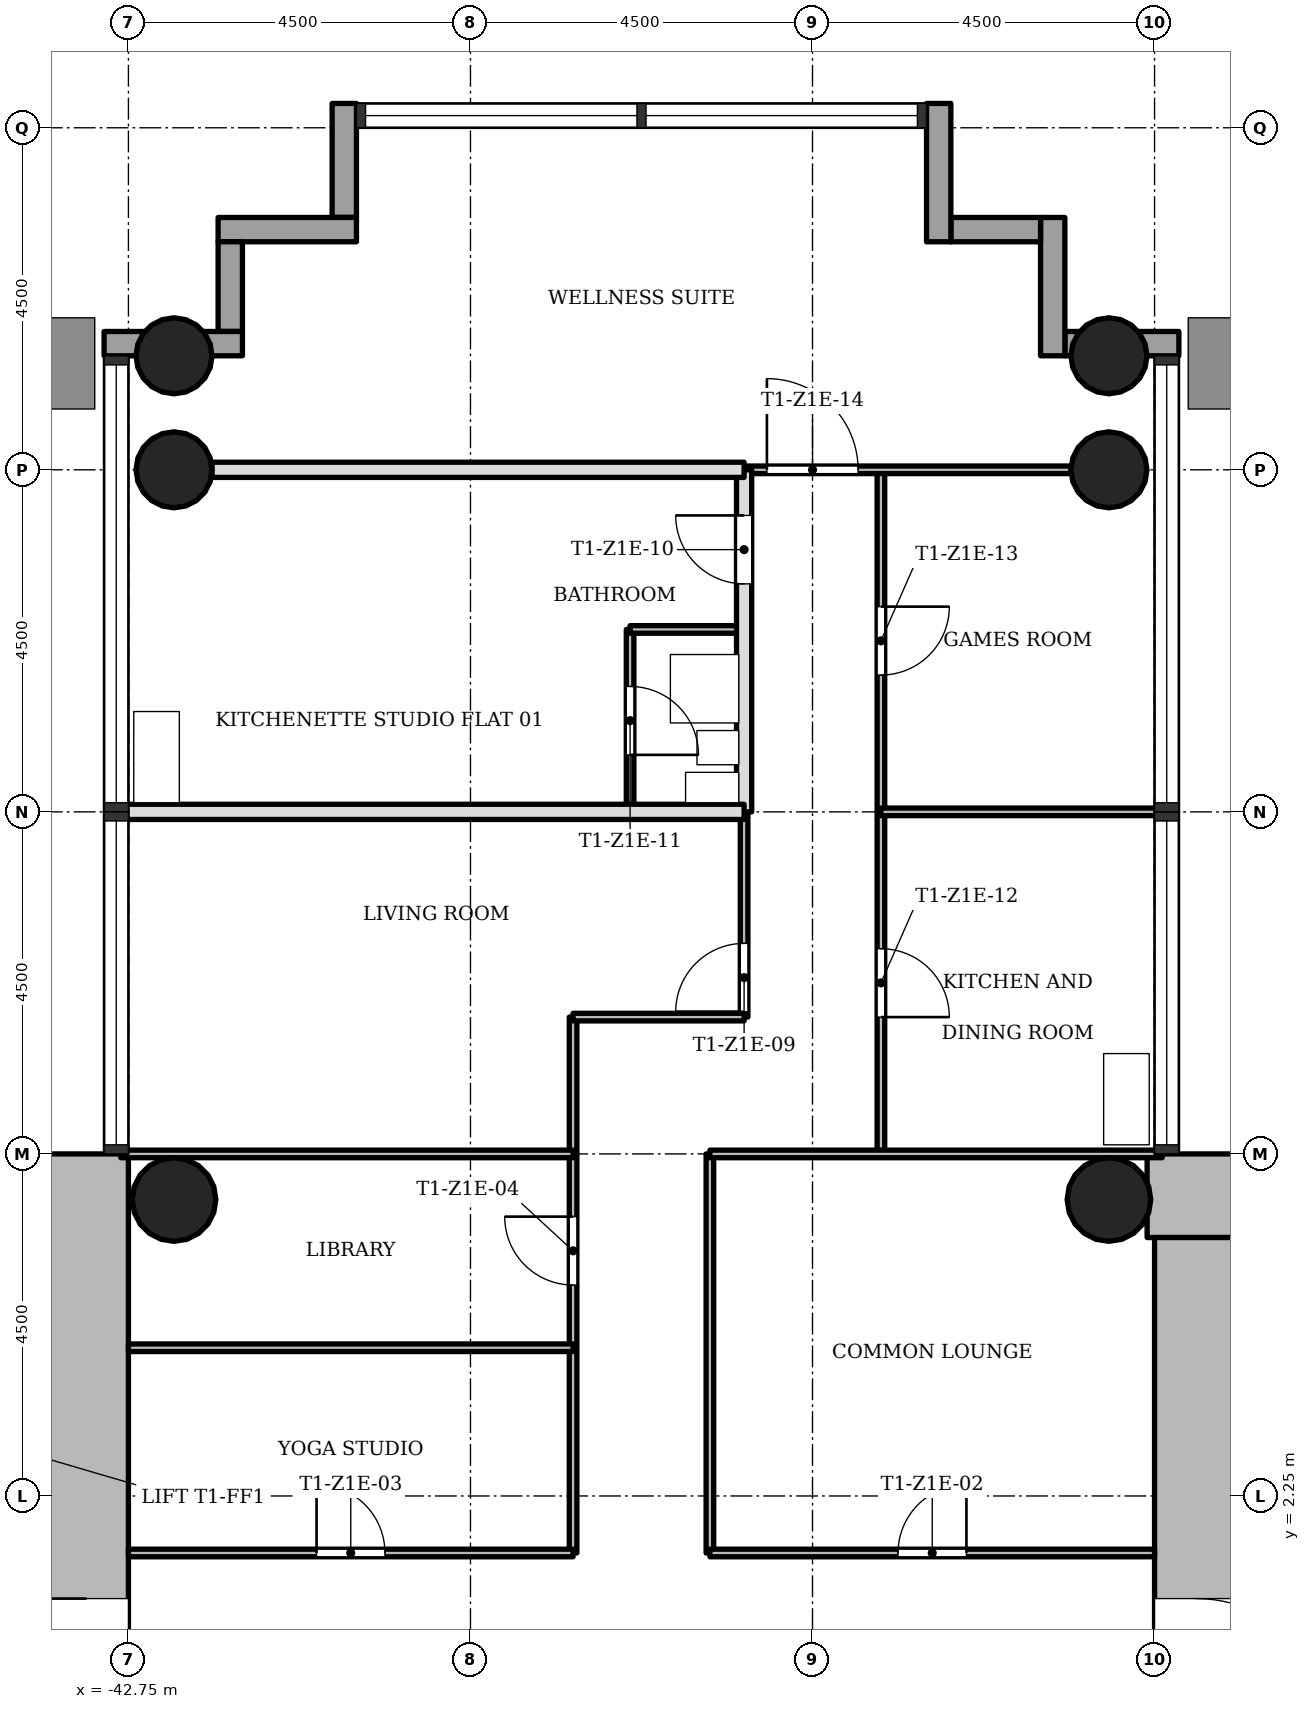
"""IFC4 building model, lengths in metres.
Left out: names, types, materials, properties, quantities, classifications, styles, units other than length and angle.
Written with IfcOpenShell. Run it as: python <this file> out.ifc"""

import sys

from ifc_helpers import new_model, si_unit, direction, frame, frame_2d, origin, origin_2d, place, context, subcontext, project, spatial, rectangle, hollow_circle, extrude, element, fill, save


model = new_model("IFC4")
c1 = context("Model", 3, precision=1e-05, world=origin(), true_north=direction((0.0, 1.0)))
c2 = subcontext(c1, "Body", "Model", "MODEL_VIEW")
j1 = project(units=[si_unit("LENGTHUNIT", "METRE"), si_unit("PLANEANGLEUNIT", "RADIAN")], contexts=[c1])
p1 = place(None, origin())
s1 = spatial("IfcSite", under=j1, at=p1, CompositionType="ELEMENT")
p2 = place(p1, origin())
s2 = spatial("IfcBuilding", under=s1, at=p2, CompositionType="ELEMENT")
p3 = place(p2, frame((0.0, 0.0, 65.3)))
s3 = spatial("IfcBuildingStorey", under=s2, at=p3, CompositionType="ELEMENT", Elevation=65.3)
p4 = place(p3, frame((-21.35, 6.2, 0.0), z_axis=(0.0, 0.0, 1.0), x_axis=(-1.0, 0.0, 0.0)))
e1 = element("IfcWall", 1, at=p4, inside=s3, PredefinedType="SHEAR", context=c2, shape_type="SweptSolid", body=[
    extrude(rectangle(XDim=7.998, YDim=1.1, at=frame_2d((3.999, 0.0))), origin(), (0.0, 0.0, 1.0), 3.4),
])
p5 = place(p3, frame((-28.7, 5.65, 0.0), z_axis=(0.0, 0.0, 1.0), x_axis=(0.0, -1.0, 0.0)))
e2 = element("IfcWall", 2, at=p5, inside=s3, PredefinedType="SHEAR", context=c2, shape_type="SweptSolid", body=[
    extrude(rectangle(XDim=12.4, YDim=1.1, at=frame_2d((6.2, 0.0))), origin(), (0.0, 0.0, 1.0), 3.4),
])
p6 = place(p5, frame((4.75, 0.0, 0.0)))
e3 = element("IfcOpeningElement", 3, at=p6, cuts=e2, PredefinedType="OPENING", context=c2, shape_type="SweptSolid", body=[
    extrude(rectangle(XDim=1.8, YDim=2.1, at=frame_2d((0.9, 1.05))), frame((0.0, 0.56, 0.0), z_axis=(0.0, -1.0, 0.0), x_axis=(1.0, 0.0, 0.0)), (0.0, 0.0, 1.0), 1.12),
])
p7 = place(p3, frame((-43.3, -5.65, 0.0), z_axis=(0.0, 0.0, 1.0), x_axis=(0.0, 1.0, 0.0)))
e4 = element("IfcWall", 4, at=p7, inside=s3, PredefinedType="SHEAR", context=c2, shape_type="SweptSolid", body=[
    extrude(rectangle(XDim=12.4, YDim=1.1, at=frame_2d((6.2, 0.0))), origin(), (0.0, 0.0, 1.0), 3.4),
])
p8 = place(p7, frame((4.75, 0.0, 0.0)))
e5 = element("IfcOpeningElement", 5, at=p8, cuts=e4, PredefinedType="OPENING", context=c2, shape_type="SweptSolid", body=[
    extrude(rectangle(XDim=1.8, YDim=2.1, at=frame_2d((0.9, 1.05))), frame((0.0, 0.56, 0.0), z_axis=(0.0, -1.0, 0.0), x_axis=(1.0, 0.0, 0.0)), (0.0, 0.0, 1.0), 1.12),
])
for number, where, z_axis, x_axis in (
    (6, (-29.85, 15.75, 0.0), (0.0, 0.0, 1.0), (1.0, 0.0, 0.0)),
    (7, (-42.15, 15.75, 0.0), (0.0, 0.0, 1.0), (1.0, 0.0, 0.0)),
    (8, (-29.85, 17.25, 0.0), (0.0, 0.0, 1.0), (1.0, 0.0, 0.0)),
    (9, (-42.15, 17.25, 0.0), (0.0, 0.0, 1.0), (1.0, 0.0, 0.0)),
):
    element("IfcColumn", number, at=place(p3, frame(where, z_axis=z_axis, x_axis=x_axis)), inside=s3, PredefinedType="COLUMN", context=c2, shape_type="SweptSolid", body=[
        extrude(hollow_circle(Radius=0.5, WallThickness=0.036, at=origin_2d()), origin(), (0.0, 0.0, 1.0), 3.4),
    ])
for number, where, z_axis, x_axis in (
    (10, (-29.85, 6.15, 0.0), (0.0, 0.0, 1.0), (1.0, 0.0, 0.0)),
    (11, (-42.15, 6.15, 0.0), (0.0, 0.0, 1.0), (1.0, 0.0, 0.0)),
):
    element("IfcColumn", number, at=place(p3, frame(where, z_axis=z_axis, x_axis=x_axis)), inside=s3, PredefinedType="COLUMN", context=c2, shape_type="SweptSolid", body=[
        extrude(hollow_circle(Radius=0.55, WallThickness=0.04, at=origin_2d()), origin(), (0.0, 0.0, 1.0), 3.4),
    ])
p9 = place(p3, frame((-28.93, 17.41, -0.3), z_axis=(0.0, 0.0, 1.0), x_axis=(-1.0, 0.0, 0.0)))
e12 = element("IfcWall", 12, at=p9, inside=s3, PredefinedType="STANDARD", context=c2, shape_type="SweptSolid", body=[
    extrude(rectangle(XDim=1.5, YDim=0.32, at=frame_2d((0.75, 0.0))), origin(), (0.0, 0.0, 1.0), 3.4),
])
p10 = place(p3, frame((-30.59, 17.25, -0.3), z_axis=(0.0, 0.0, 1.0), x_axis=(0.0, 1.0, 0.0)))
e13 = element("IfcWall", 13, at=p10, inside=s3, PredefinedType="STANDARD", context=c2, shape_type="SweptSolid", body=[
    extrude(rectangle(XDim=1.82, YDim=0.32, at=frame_2d((0.91, 0.0))), origin(), (0.0, 0.0, 1.0), 3.4),
])
p11 = place(p3, frame((-30.75, 18.91, -0.3), z_axis=(0.0, 0.0, 1.0), x_axis=(-1.0, 0.0, 0.0)))
e14 = element("IfcWall", 14, at=p11, inside=s3, PredefinedType="STANDARD", context=c2, shape_type="SweptSolid", body=[
    extrude(rectangle(XDim=1.18, YDim=0.32, at=frame_2d((0.59, 0.0))), origin(), (0.0, 0.0, 1.0), 3.4),
])
p12 = place(p3, frame((-32.09, 18.75, -0.3), z_axis=(0.0, 0.0, 1.0), x_axis=(0.0, 1.0, 0.0)))
e15 = element("IfcWall", 15, at=p12, inside=s3, PredefinedType="STANDARD", context=c2, shape_type="SweptSolid", body=[
    extrude(rectangle(XDim=1.82, YDim=0.32, at=frame_2d((0.91, 0.0))), origin(), (0.0, 0.0, 1.0), 3.4),
])
p13 = place(p3, frame((-39.91, 20.57, -0.3), z_axis=(0.0, 0.0, 1.0), x_axis=(0.0, -1.0, 0.0)))
e16 = element("IfcWall", 16, at=p13, inside=s3, PredefinedType="STANDARD", context=c2, shape_type="SweptSolid", body=[
    extrude(rectangle(XDim=1.5, YDim=0.32, at=frame_2d((0.75, 0.0))), origin(), (0.0, 0.0, 1.0), 3.4),
])
p14 = place(p3, frame((-39.75, 18.91, -0.3), z_axis=(0.0, 0.0, 1.0), x_axis=(-1.0, 0.0, 0.0)))
e17 = element("IfcWall", 17, at=p14, inside=s3, PredefinedType="STANDARD", context=c2, shape_type="SweptSolid", body=[
    extrude(rectangle(XDim=1.82, YDim=0.32, at=frame_2d((0.91, 0.0))), origin(), (0.0, 0.0, 1.0), 3.4),
])
p15 = place(p3, frame((-41.41, 18.75, -0.3), z_axis=(0.0, 0.0, 1.0), x_axis=(0.0, -1.0, 0.0)))
e18 = element("IfcWall", 18, at=p15, inside=s3, PredefinedType="STANDARD", context=c2, shape_type="SweptSolid", body=[
    extrude(rectangle(XDim=1.18, YDim=0.32, at=frame_2d((0.59, 0.0))), origin(), (0.0, 0.0, 1.0), 3.4),
])
p16 = place(p3, frame((-41.25, 17.41, -0.3), z_axis=(0.0, 0.0, 1.0), x_axis=(-1.0, 0.0, 0.0)))
e19 = element("IfcWall", 19, at=p16, inside=s3, PredefinedType="STANDARD", context=c2, shape_type="SweptSolid", body=[
    extrude(rectangle(XDim=1.82, YDim=0.32, at=frame_2d((0.91, 0.0))), origin(), (0.0, 0.0, 1.0), 3.4),
])
p17 = place(p3, frame((-36.9, 1.5, 0.0), z_axis=(0.0, 0.0, 1.0), x_axis=(0.0, 1.0, 0.0)))
e20 = element("IfcWall", 20, at=p17, inside=s3, PredefinedType="PARTITIONING", context=c2, shape_type="SweptSolid", body=[
    extrude(rectangle(XDim=7.05, YDim=0.1, at=frame_2d((3.525, 0.0))), origin(), (0.0, 0.0, 1.0), 3.0),
])
p18 = place(p17, frame((3.525, 0.0, 0.0)))
e21 = element("IfcOpeningElement", 21, at=p18, cuts=e20, PredefinedType="OPENING", context=c2, shape_type="SweptSolid", body=[
    extrude(rectangle(XDim=0.9, YDim=2.1, at=frame_2d((0.45, 1.05))), frame((0.0, 0.06, 0.0), z_axis=(0.0, -1.0, 0.0), x_axis=(1.0, 0.0, 0.0)), (0.0, 0.0, 1.0), 0.12),
])
p19 = place(p3, frame((-36.15, 11.25, 0.0), z_axis=(0.0, 0.0, 1.0), x_axis=(0.0, 1.0, 0.0)))
e22 = element("IfcWall", 22, at=p19, inside=s3, PredefinedType="PARTITIONING", context=c2, shape_type="SweptSolid", body=[
    extrude(rectangle(XDim=2.4, YDim=0.1, at=frame_2d((1.2, 0.0))), origin(), (0.0, 0.0, 1.0), 3.0),
])
p20 = place(p19, frame((0.75, 0.0, 0.0)))
e23 = element("IfcOpeningElement", 23, at=p20, cuts=e22, PredefinedType="OPENING", context=c2, shape_type="SweptSolid", body=[
    extrude(rectangle(XDim=0.9, YDim=2.1, at=frame_2d((0.45, 1.05))), frame((0.0, 0.06, 0.0), z_axis=(0.0, -1.0, 0.0), x_axis=(1.0, 0.0, 0.0)), (0.0, 0.0, 1.0), 0.12),
])
p21 = place(p3, frame((-35.1, 1.5, 0.0), z_axis=(0.0, 0.0, 1.0), x_axis=(0.0, 1.0, 0.0)))
e24 = element("IfcWall", 24, at=p21, inside=s3, PredefinedType="PARTITIONING", context=c2, shape_type="SweptSolid", body=[
    extrude(rectangle(XDim=5.25, YDim=0.1, at=frame_2d((2.625, 0.0))), origin(), (0.0, 0.0, 1.0), 3.0),
])
p22 = place(p3, frame((-34.65, 8.55, 0.0), z_axis=(0.0, 0.0, 1.0), x_axis=(0.0, 1.0, 0.0)))
e25 = element("IfcWall", 25, at=p22, inside=s3, PredefinedType="PARTITIONING", context=c2, shape_type="SweptSolid", body=[
    extrude(rectangle(XDim=2.7, YDim=0.1, at=frame_2d((1.35, 0.0))), origin(), (0.0, 0.0, 1.0), 3.0),
])
p23 = place(p22, frame((0.07, 0.0, 0.0)))
e26 = element("IfcOpeningElement", 26, at=p23, cuts=e25, PredefinedType="OPENING", context=c2, shape_type="SweptSolid", body=[
    extrude(rectangle(XDim=0.9, YDim=2.1, at=frame_2d((0.45, 1.05))), frame((0.0, 0.06, 0.0), z_axis=(0.0, -1.0, 0.0), x_axis=(1.0, 0.0, 0.0)), (0.0, 0.0, 1.0), 0.12),
])
p24 = place(p3, frame((-34.65, 11.25, 0.0), z_axis=(0.0, 0.0, 1.0), x_axis=(0.0, 1.0, 0.0)))
e27 = element("IfcWall", 27, at=p24, inside=s3, PredefinedType="SOLIDWALL", context=c2, shape_type="SweptSolid", body=[
    extrude(rectangle(XDim=4.5, YDim=0.2, at=frame_2d((2.25, 0.0))), origin(), (0.0, 0.0, 1.0), 3.0),
])
p25 = place(p24, frame((3.0, 0.0, 0.0)))
e28 = element("IfcOpeningElement", 28, at=p25, cuts=e27, PredefinedType="OPENING", context=c2, shape_type="SweptSolid", body=[
    extrude(rectangle(XDim=0.9, YDim=2.1, at=frame_2d((0.45, 1.05))), frame((0.0, 0.11, 0.0), z_axis=(0.0, -1.0, 0.0), x_axis=(1.0, 0.0, 0.0)), (0.0, 0.0, 1.0), 0.22),
])
p26 = place(p3, frame((-32.85, 6.75, 0.0), z_axis=(0.0, 0.0, 1.0), x_axis=(0.0, 1.0, 0.0)))
e29 = element("IfcWall", 29, at=p26, inside=s3, PredefinedType="PARTITIONING", context=c2, shape_type="SweptSolid", body=[
    extrude(rectangle(XDim=9.0, YDim=0.1, at=frame_2d((4.5, 0.0))), origin(), (0.0, 0.0, 1.0), 3.0),
])
p27 = place(p26, frame((1.8, 0.0, 0.0)))
e30 = element("IfcOpeningElement", 30, at=p27, cuts=e29, PredefinedType="OPENING", context=c2, shape_type="SweptSolid", body=[
    extrude(rectangle(XDim=0.9, YDim=2.1, at=frame_2d((0.45, 1.05))), frame((0.0, 0.06, 0.0), z_axis=(0.0, -1.0, 0.0), x_axis=(1.0, 0.0, 0.0)), (0.0, 0.0, 1.0), 0.12),
])
p28 = place(p26, frame((6.3, 0.0, 0.0)))
e31 = element("IfcOpeningElement", 31, at=p28, cuts=e29, PredefinedType="OPENING", context=c2, shape_type="SweptSolid", body=[
    extrude(rectangle(XDim=0.9, YDim=2.1, at=frame_2d((0.45, 1.05))), frame((0.0, 0.06, 0.0), z_axis=(0.0, -1.0, 0.0), x_axis=(1.0, 0.0, 0.0)), (0.0, 0.0, 1.0), 0.12),
])
p29 = place(p3, frame((-42.75, 1.5, 0.0), z_axis=(0.0, 0.0, 1.0), x_axis=(1.0, 0.0, 0.0)))
e32 = element("IfcWall", 32, at=p29, inside=s3, PredefinedType="PARTITIONING", context=c2, shape_type="SweptSolid", body=[
    extrude(rectangle(XDim=5.85, YDim=0.1, at=frame_2d((2.925, 0.0))), origin(), (0.0, 0.0, 1.0), 3.0),
])
p30 = place(p29, frame((2.475, 0.0, 0.0)))
e33 = element("IfcOpeningElement", 33, at=p30, cuts=e32, PredefinedType="OPENING", context=c2, shape_type="SweptSolid", body=[
    extrude(rectangle(XDim=0.9, YDim=2.1, at=frame_2d((0.45, 1.05))), frame((0.0, 0.06, 0.0), z_axis=(0.0, -1.0, 0.0), x_axis=(1.0, 0.0, 0.0)), (0.0, 0.0, 1.0), 0.12),
])
p31 = place(p3, frame((-35.1, 1.5, 0.0), z_axis=(0.0, 0.0, 1.0), x_axis=(1.0, 0.0, 0.0)))
e34 = element("IfcWall", 34, at=p31, inside=s3, PredefinedType="PARTITIONING", context=c2, shape_type="SweptSolid", body=[
    extrude(rectangle(XDim=5.85, YDim=0.1, at=frame_2d((2.925, 0.0))), origin(), (0.0, 0.0, 1.0), 3.0),
])
p32 = place(p31, frame((2.475, 0.0, 0.0)))
e35 = element("IfcOpeningElement", 35, at=p32, cuts=e34, PredefinedType="OPENING", context=c2, shape_type="SweptSolid", body=[
    extrude(rectangle(XDim=0.9, YDim=2.1, at=frame_2d((0.45, 1.05))), frame((0.0, 0.06, 0.0), z_axis=(0.0, -1.0, 0.0), x_axis=(1.0, 0.0, 0.0)), (0.0, 0.0, 1.0), 0.12),
])
p33 = place(p3, frame((-42.75, 4.2, 0.0), z_axis=(0.0, 0.0, 1.0), x_axis=(1.0, 0.0, 0.0)))
e36 = element("IfcWall", 36, at=p33, inside=s3, PredefinedType="PARTITIONING", context=c2, shape_type="SweptSolid", body=[
    extrude(rectangle(XDim=5.85, YDim=0.1, at=frame_2d((2.925, 0.0))), origin(), (0.0, 0.0, 1.0), 3.0),
])
for number, where, z_axis, x_axis in (
    (37, (-42.85, 6.75, 0.0), (0.0, 0.0, 1.0), (1.0, 0.0, 0.0)),
    (38, (-35.1, 6.75, 0.0), (0.0, 0.0, 1.0), (1.0, 0.0, 0.0)),
):
    element("IfcWall", number, at=place(p3, frame(where, z_axis=z_axis, x_axis=x_axis)), inside=s3, PredefinedType="PARTITIONING", context=c2, shape_type="SweptSolid", body=[
        extrude(rectangle(XDim=5.95, YDim=0.1, at=frame_2d((2.975, 0.0))), origin(), (0.0, 0.0, 1.0), 3.0),
    ])
p34 = place(p3, frame((-36.9, 8.55, 0.0), z_axis=(0.0, 0.0, 1.0), x_axis=(1.0, 0.0, 0.0)))
e39 = element("IfcWall", 39, at=p34, inside=s3, PredefinedType="PARTITIONING", context=c2, shape_type="SweptSolid", body=[
    extrude(rectangle(XDim=2.25, YDim=0.1, at=frame_2d((1.125, 0.0))), origin(), (0.0, 0.0, 1.0), 3.0),
])
p35 = place(p3, frame((-32.85, 11.25, 0.0), z_axis=(0.0, 0.0, 1.0), x_axis=(1.0, 0.0, 0.0)))
e40 = element("IfcWall", 40, at=p35, inside=s3, PredefinedType="PARTITIONING", context=c2, shape_type="SweptSolid", body=[
    extrude(rectangle(XDim=3.7, YDim=0.1, at=frame_2d((1.85, 0.0))), origin(), (0.0, 0.0, 1.0), 3.0),
])
p36 = place(p3, frame((-42.85, 11.25, 0.0), z_axis=(0.0, 0.0, 1.0), x_axis=(1.0, 0.0, 0.0)))
e41 = element("IfcWall", 41, at=p36, inside=s3, PredefinedType="SOLIDWALL", context=c2, shape_type="SweptSolid", body=[
    extrude(rectangle(XDim=8.2, YDim=0.2, at=frame_2d((4.1, 0.0))), origin(), (0.0, 0.0, 1.0), 3.0),
])
p37 = place(p3, frame((-36.15, 13.65, 0.0), z_axis=(0.0, 0.0, 1.0), x_axis=(1.0, 0.0, 0.0)))
e42 = element("IfcWall", 42, at=p37, inside=s3, PredefinedType="PARTITIONING", context=c2, shape_type="SweptSolid", body=[
    extrude(rectangle(XDim=1.5, YDim=0.1, at=frame_2d((0.75, 0.0))), origin(), (0.0, 0.0, 1.0), 3.0),
])
p38 = place(p3, frame((-34.65, 15.75, 0.0), z_axis=(0.0, 0.0, 1.0), x_axis=(1.0, 0.0, 0.0)))
e43 = element("IfcWall", 43, at=p38, inside=s3, PredefinedType="PARTITIONING", context=c2, shape_type="SweptSolid", body=[
    extrude(rectangle(XDim=4.3, YDim=0.1, at=frame_2d((2.15, 0.0))), origin(), (0.0, 0.0, 1.0), 3.0),
])
p39 = place(p38, frame((0.3, 0.0, 0.0)))
e44 = element("IfcOpeningElement", 44, at=p39, cuts=e43, PredefinedType="OPENING", context=c2, shape_type="SweptSolid", body=[
    extrude(rectangle(XDim=1.2, YDim=2.1, at=frame_2d((0.6, 1.05))), frame((0.0, 0.06, 0.0), z_axis=(0.0, -1.0, 0.0), x_axis=(1.0, 0.0, 0.0)), (0.0, 0.0, 1.0), 0.12),
])
p40 = place(p3, frame((-41.65, 15.75, 0.0), z_axis=(0.0, 0.0, 1.0), x_axis=(1.0, 0.0, 0.0)))
e45 = element("IfcWall", 45, at=p40, inside=s3, PredefinedType="SOLIDWALL", context=c2, shape_type="SweptSolid", body=[
    extrude(rectangle(XDim=7.0, YDim=0.2, at=frame_2d((3.5, 0.0))), origin(), (0.0, 0.0, 1.0), 3.0),
])
p41 = place(p32, origin())
e46 = element("IfcDoor", 46, at=p41, inside=s3, OperationType="SINGLE_SWING_LEFT", PredefinedType="DOOR", context=c2, shape_type="SweptSolid", body=[
    extrude(rectangle(XDim=0.9, YDim=2.1, at=frame_2d((0.45, 1.05))), frame((0.0, 0.025, 0.0), z_axis=(0.0, -1.0, 0.0), x_axis=(1.0, 0.0, 0.0)), (0.0, 0.0, 1.0), 0.05),
])
fill(e35, e46)
p42 = place(p30, origin())
e47 = element("IfcDoor", 47, at=p42, inside=s3, OperationType="SINGLE_SWING_RIGHT", PredefinedType="DOOR", context=c2, shape_type="SweptSolid", body=[
    extrude(rectangle(XDim=0.9, YDim=2.1, at=frame_2d((0.45, 1.05))), frame((0.0, 0.025, 0.0), z_axis=(0.0, -1.0, 0.0), x_axis=(1.0, 0.0, 0.0)), (0.0, 0.0, 1.0), 0.05),
])
fill(e33, e47)
p43 = place(p18, origin())
e48 = element("IfcDoor", 48, at=p43, inside=s3, OperationType="SINGLE_SWING_LEFT", PredefinedType="DOOR", context=c2, shape_type="SweptSolid", body=[
    extrude(rectangle(XDim=0.9, YDim=2.1, at=frame_2d((0.45, 1.05))), frame((0.0, 0.025, 0.0), z_axis=(0.0, -1.0, 0.0), x_axis=(1.0, 0.0, 0.0)), (0.0, 0.0, 1.0), 0.05),
])
fill(e21, e48)
p44 = place(p23, origin())
e49 = element("IfcDoor", 49, at=p44, inside=s3, OperationType="SINGLE_SWING_RIGHT", PredefinedType="DOOR", context=c2, shape_type="SweptSolid", body=[
    extrude(rectangle(XDim=0.9, YDim=2.1, at=frame_2d((0.45, 1.05))), frame((0.0, 0.025, 0.0), z_axis=(0.0, -1.0, 0.0), x_axis=(1.0, 0.0, 0.0)), (0.0, 0.0, 1.0), 0.05),
])
fill(e26, e49)
p45 = place(p25, origin())
e50 = element("IfcDoor", 50, at=p45, inside=s3, OperationType="SINGLE_SWING_LEFT", PredefinedType="DOOR", context=c2, shape_type="SweptSolid", body=[
    extrude(rectangle(XDim=0.9, YDim=2.1, at=frame_2d((0.45, 1.05))), frame((0.0, 0.025, 0.0), z_axis=(0.0, -1.0, 0.0), x_axis=(1.0, 0.0, 0.0)), (0.0, 0.0, 1.0), 0.05),
])
fill(e28, e50)
p46 = place(p20, origin())
e51 = element("IfcDoor", 51, at=p46, inside=s3, OperationType="SINGLE_SWING_LEFT", PredefinedType="DOOR", context=c2, shape_type="SweptSolid", body=[
    extrude(rectangle(XDim=0.9, YDim=2.1, at=frame_2d((0.45, 1.05))), frame((0.0, 0.025, 0.0), z_axis=(0.0, -1.0, 0.0), x_axis=(1.0, 0.0, 0.0)), (0.0, 0.0, 1.0), 0.05),
])
fill(e23, e51)
p47 = place(p27, origin())
e52 = element("IfcDoor", 52, at=p47, inside=s3, OperationType="SINGLE_SWING_LEFT", PredefinedType="DOOR", context=c2, shape_type="SweptSolid", body=[
    extrude(rectangle(XDim=0.9, YDim=2.1, at=frame_2d((0.45, 1.05))), frame((0.0, 0.025, 0.0), z_axis=(0.0, -1.0, 0.0), x_axis=(1.0, 0.0, 0.0)), (0.0, 0.0, 1.0), 0.05),
])
fill(e30, e52)
p48 = place(p28, origin())
e53 = element("IfcDoor", 53, at=p48, inside=s3, OperationType="SINGLE_SWING_RIGHT", PredefinedType="DOOR", context=c2, shape_type="SweptSolid", body=[
    extrude(rectangle(XDim=0.9, YDim=2.1, at=frame_2d((0.45, 1.05))), frame((0.0, 0.025, 0.0), z_axis=(0.0, -1.0, 0.0), x_axis=(1.0, 0.0, 0.0)), (0.0, 0.0, 1.0), 0.05),
])
fill(e31, e53)
p49 = place(p39, origin())
e54 = element("IfcDoor", 54, at=p49, inside=s3, OperationType="SINGLE_SWING_RIGHT", PredefinedType="DOOR", context=c2, shape_type="SweptSolid", body=[
    extrude(rectangle(XDim=1.2, YDim=2.1, at=frame_2d((0.6, 1.05))), frame((0.0, 0.025, 0.0), z_axis=(0.0, -1.0, 0.0), x_axis=(1.0, 0.0, 0.0)), (0.0, 0.0, 1.0), 0.05),
])
fill(e44, e54)
p50 = place(p6, origin())
e55 = element("IfcDoor", 55, at=p50, inside=s3, OperationType="SINGLE_SWING_LEFT", PredefinedType="DOOR", context=c2, shape_type="SweptSolid", body=[
    extrude(rectangle(XDim=1.8, YDim=2.1, at=frame_2d((0.9, 1.05))), frame((0.0, 0.025, 0.0), z_axis=(0.0, -1.0, 0.0), x_axis=(1.0, 0.0, 0.0)), (0.0, 0.0, 1.0), 0.05),
])
fill(e3, e55)
p51 = place(p8, origin())
e56 = element("IfcDoor", 56, at=p51, inside=s3, OperationType="SINGLE_SWING_LEFT", PredefinedType="DOOR", context=c2, shape_type="SweptSolid", body=[
    extrude(rectangle(XDim=1.8, YDim=2.1, at=frame_2d((0.9, 1.05))), frame((0.0, 0.025, 0.0), z_axis=(0.0, -1.0, 0.0), x_axis=(1.0, 0.0, 0.0)), (0.0, 0.0, 1.0), 0.05),
])
fill(e5, e56)
save(model, sys.argv[1])
